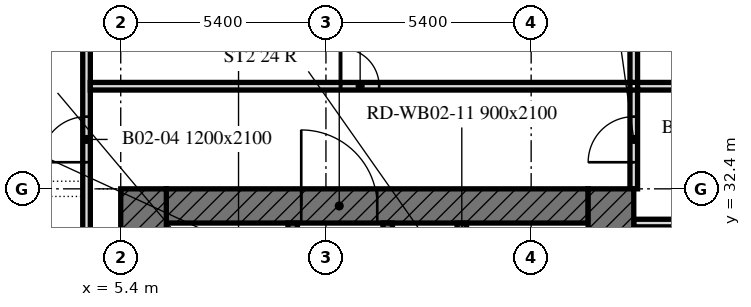
"""IFC4 building model, lengths in metres.
Left out: names, types, materials, properties, quantities, classifications, styles, units other than length and angle.
Written with IfcOpenShell. Run it as: python <this file> out.ifc"""

import sys

from ifc_helpers import new_model, si_unit, direction, frame, frame_2d, origin, place, context, subcontext, project, spatial, rectangle, extrude, element, fill, save


model = new_model("IFC4")
c1 = context("Model", 3, precision=1e-05, world=origin(), true_north=direction((0.0, 1.0)))
c2 = subcontext(c1, "Body", "Model", "MODEL_VIEW")
j1 = project(units=[si_unit("LENGTHUNIT", "METRE"), si_unit("PLANEANGLEUNIT", "RADIAN")], contexts=[c1])
p1 = place(None, origin())
s1 = spatial("IfcSite", under=j1, at=p1, CompositionType="ELEMENT")
p2 = place(p1, origin())
s2 = spatial("IfcBuilding", under=s1, at=p2, CompositionType="ELEMENT")
p3 = place(p2, frame((0.0, 0.0, -9.0)))
s3 = spatial("IfcBuildingStorey", under=s2, at=p3, CompositionType="ELEMENT", Elevation=-9.0)
p4 = place(p3, frame((4.5, 4.4, 0.0), z_axis=(0.0, 0.0, 1.0), x_axis=(0.0, 1.0, 0.0)))
e1 = element("IfcWall", 1, at=p4, inside=s3, PredefinedType="PARTITIONING", context=c2, shape_type="SweptSolid", body=[
    extrude(rectangle(XDim=39.8, YDim=0.2, at=frame_2d((19.9, 0.0))), origin(), (0.0, 0.0, 1.0), 4.1),
])
p5 = place(p4, frame((9.9, 0.0, 0.0)))
e2 = element("IfcOpeningElement", 2, at=p5, cuts=e1, PredefinedType="OPENING", context=c2, shape_type="SweptSolid", body=[
    extrude(rectangle(XDim=1.2, YDim=2.1, at=frame_2d((0.6, 1.05))), frame((0.0, 0.11, 0.0), z_axis=(0.0, -1.0, 0.0), x_axis=(1.0, 0.0, 0.0)), (0.0, 0.0, 1.0), 0.22),
])
p6 = place(p4, frame((28.7, 0.0, 0.0)))
e3 = element("IfcOpeningElement", 3, at=p6, cuts=e1, PredefinedType="OPENING", context=c2, shape_type="SweptSolid", body=[
    extrude(rectangle(XDim=1.2, YDim=2.1, at=frame_2d((0.6, 1.05))), frame((0.0, 0.11, 0.0), z_axis=(0.0, -1.0, 0.0), x_axis=(1.0, 0.0, 0.0)), (0.0, 0.0, 1.0), 0.22),
])
p7 = place(p3, frame((18.9, 35.2, 0.0), z_axis=(0.0, 0.0, 1.0), x_axis=(0.0, 1.0, 0.0)))
e4 = element("IfcWall", 4, at=p7, inside=s3, PredefinedType="PARTITIONING", context=c2, shape_type="SweptSolid", body=[
    extrude(rectangle(XDim=8.8, YDim=0.2, at=frame_2d((4.4, 0.0))), origin(), (0.0, 0.0, 1.0), 4.1),
])
p8 = place(p3, frame((4.6, 35.1, 0.0), z_axis=(0.0, 0.0, 1.0), x_axis=(1.0, 0.0, 0.0)))
e5 = element("IfcWall", 5, at=p8, inside=s3, PredefinedType="PARTITIONING", context=c2, shape_type="SweptSolid", body=[
    extrude(rectangle(XDim=14.2, YDim=0.2, at=frame_2d((7.1, 0.0))), origin(), (0.0, 0.0, 1.0), 4.1),
])
p9 = place(p8, frame((6.6, 0.0, 0.0)))
e6 = element("IfcOpeningElement", 6, at=p9, cuts=e5, PredefinedType="OPENING", context=c2, shape_type="SweptSolid", body=[
    extrude(rectangle(XDim=1.0, YDim=2.1, at=frame_2d((0.5, 1.05))), frame((0.0, 0.11, 0.0), z_axis=(0.0, -1.0, 0.0), x_axis=(1.0, 0.0, 0.0)), (0.0, 0.0, 1.0), 0.22),
])
p10 = place(p3, frame((19.0, 35.1, 0.0), z_axis=(0.0, 0.0, 1.0), x_axis=(1.0, 0.0, 0.0)))
e7 = element("IfcWall", 7, at=p10, inside=s3, PredefinedType="PARTITIONING", context=c2, shape_type="SweptSolid", body=[
    extrude(rectangle(XDim=5.2, YDim=0.2, at=frame_2d((2.6, 0.0))), origin(), (0.0, 0.0, 1.0), 4.1),
])
p11 = place(p10, frame((2.1, 0.0, 0.0)))
e8 = element("IfcOpeningElement", 8, at=p11, cuts=e7, PredefinedType="OPENING", context=c2, shape_type="SweptSolid", body=[
    extrude(rectangle(XDim=1.0, YDim=2.1, at=frame_2d((0.5, 1.05))), frame((0.0, 0.11, 0.0), z_axis=(0.0, -1.0, 0.0), x_axis=(1.0, 0.0, 0.0)), (0.0, 0.0, 1.0), 0.22),
])
p12 = place(p3, frame((18.9, 32.4, 0.0), z_axis=(0.0, 0.0, 1.0), x_axis=(0.0, 1.0, 0.0)))
e9 = element("IfcWall", 9, at=p12, inside=s3, PredefinedType="PARTITIONING", context=c2, shape_type="SweptSolid", body=[
    extrude(rectangle(XDim=2.6, YDim=0.2, at=frame_2d((1.3, 0.0))), origin(), (0.0, 0.0, 1.0), 4.1),
])
p13 = place(p12, frame((0.7, 0.0, 0.0)))
e10 = element("IfcOpeningElement", 10, at=p13, cuts=e9, PredefinedType="OPENING", context=c2, shape_type="SweptSolid", body=[
    extrude(rectangle(XDim=1.2, YDim=2.1, at=frame_2d((0.6, 1.05))), frame((0.0, 0.11, 0.0), z_axis=(0.0, -1.0, 0.0), x_axis=(1.0, 0.0, 0.0)), (0.0, 0.0, 1.0), 0.22),
])
p14 = place(p3, frame((18.9, 31.5, 0.0), z_axis=(0.0, 0.0, 1.0), x_axis=(1.0, 0.0, 0.0)))
e11 = element("IfcWall", 11, at=p14, inside=s3, PredefinedType="PARTITIONING", context=c2, shape_type="SweptSolid", body=[
    extrude(rectangle(XDim=10.8, YDim=0.2, at=frame_2d((5.4, 0.0))), origin(), (0.0, 0.0, 1.0), 4.1),
])
p15 = place(p3, frame((6.6, 31.95, 0.0), z_axis=(0.0, 0.0, 1.0), x_axis=(1.0, 0.0, 0.0)))
e12 = element("IfcWall", 12, at=p15, inside=s3, PredefinedType="SOLIDWALL", context=c2, shape_type="SweptSolid", body=[
    extrude(rectangle(XDim=11.1, YDim=0.9, at=frame_2d((5.55, 0.0))), origin(), (0.0, 0.0, 1.0), 4.1),
])
p16 = place(p15, frame((3.55, 0.0, 0.0)))
e13 = element("IfcOpeningElement", 13, at=p16, cuts=e12, PredefinedType="OPENING", context=c2, shape_type="SweptSolid", body=[
    extrude(rectangle(XDim=2.0, YDim=2.4, at=frame_2d((1.0, 1.2))), frame((0.0, 0.45, 0.0), z_axis=(0.0, -1.0, 0.0), x_axis=(1.0, 0.0, 0.0)), (0.0, 0.0, 1.0), 0.9),
])
for number, where, z_axis, x_axis in (
    (14, (6.0, 16.2, 0.0), (0.0, 0.0, 1.0), (0.0, 1.0, 0.0)),
    (15, (18.3, 32.4, 0.0), (0.0, 0.0, 1.0), (0.0, -1.0, 0.0)),
):
    element("IfcWall", number, at=place(p3, frame(where, z_axis=z_axis, x_axis=x_axis)), inside=s3, PredefinedType="SOLIDWALL", context=c2, shape_type="SweptSolid", body=[
        extrude(rectangle(XDim=16.2, YDim=1.2, at=frame_2d((8.1, 0.0))), origin(), (0.0, 0.0, 1.0), 4.1),
    ])
p17 = place(p3, frame((9.925, 17.1, 0.0), z_axis=(0.0, 0.0, 1.0), x_axis=(0.0, 1.0, 0.0)))
e16 = element("IfcWall", 16, at=p17, inside=s3, PredefinedType="SOLIDWALL", context=c2, shape_type="SweptSolid", body=[
    extrude(rectangle(XDim=14.4, YDim=0.25, at=frame_2d((7.2, 0.0))), origin(), (0.0, 0.0, 1.0), 4.1),
])
p18 = place(p17, frame((4.6, 0.0, 0.0)))
e17 = element("IfcOpeningElement", 17, at=p18, cuts=e16, PredefinedType="OPENING", context=c2, shape_type="SweptSolid", body=[
    extrude(rectangle(XDim=1.0, YDim=2.1, at=frame_2d((0.5, 1.05))), frame((0.0, 0.125, 0.0), z_axis=(0.0, -1.0, 0.0), x_axis=(1.0, 0.0, 0.0)), (0.0, 0.0, 1.0), 0.25),
])
p19 = place(p17, frame((7.062, 0.0, 0.0)))
e18 = element("IfcOpeningElement", 18, at=p19, cuts=e16, PredefinedType="OPENING", context=c2, shape_type="SweptSolid", body=[
    extrude(rectangle(XDim=1.2, YDim=2.1, at=frame_2d((0.6, 1.05))), frame((0.0, 0.125, 0.0), z_axis=(0.0, -1.0, 0.0), x_axis=(1.0, 0.0, 0.0)), (0.0, 0.0, 1.0), 0.25),
])
p20 = place(p17, frame((9.925, 0.0, 0.0)))
e19 = element("IfcOpeningElement", 19, at=p20, cuts=e16, PredefinedType="OPENING", context=c2, shape_type="SweptSolid", body=[
    extrude(rectangle(XDim=1.1, YDim=2.1, at=frame_2d((0.55, 1.05))), frame((0.0, 0.125, 0.0), z_axis=(0.0, -1.0, 0.0), x_axis=(1.0, 0.0, 0.0)), (0.0, 0.0, 1.0), 0.25),
])
p21 = place(p17, frame((12.587, 0.0, 0.0)))
e20 = element("IfcOpeningElement", 20, at=p21, cuts=e16, PredefinedType="OPENING", context=c2, shape_type="SweptSolid", body=[
    extrude(rectangle(XDim=1.1, YDim=2.1, at=frame_2d((0.55, 1.05))), frame((0.0, 0.125, 0.0), z_axis=(0.0, -1.0, 0.0), x_axis=(1.0, 0.0, 0.0)), (0.0, 0.0, 1.0), 0.25),
])
p22 = place(p3, frame((14.375, 17.1, 0.0), z_axis=(0.0, 0.0, 1.0), x_axis=(0.0, 1.0, 0.0)))
e21 = element("IfcWall", 21, at=p22, inside=s3, PredefinedType="SOLIDWALL", context=c2, shape_type="SweptSolid", body=[
    extrude(rectangle(XDim=14.4, YDim=0.25, at=frame_2d((7.2, 0.0))), origin(), (0.0, 0.0, 1.0), 4.1),
])
p23 = place(p22, frame((13.15, 0.0, 0.0)))
e22 = element("IfcOpeningElement", 22, at=p23, cuts=e21, PredefinedType="OPENING", context=c2, shape_type="SweptSolid", body=[
    extrude(rectangle(XDim=1.0, YDim=2.1, at=frame_2d((0.5, 1.05))), frame((0.0, 0.125, 0.0), z_axis=(0.0, -1.0, 0.0), x_axis=(1.0, 0.0, 0.0)), (0.0, 0.0, 1.0), 0.25),
])
p24 = place(p22, frame((0.725, 0.0, 0.0)))
e23 = element("IfcOpeningElement", 23, at=p24, cuts=e21, PredefinedType="OPENING", context=c2, shape_type="SweptSolid", body=[
    extrude(rectangle(XDim=0.9, YDim=2.1, at=frame_2d((0.45, 1.05))), frame((0.0, 0.125, 0.0), z_axis=(0.0, -1.0, 0.0), x_axis=(1.0, 0.0, 0.0)), (0.0, 0.0, 1.0), 0.25),
])
p25 = place(p22, frame((3.225, 0.0, 0.0)))
e24 = element("IfcOpeningElement", 24, at=p25, cuts=e21, PredefinedType="OPENING", context=c2, shape_type="SweptSolid", body=[
    extrude(rectangle(XDim=0.9, YDim=2.1, at=frame_2d((0.45, 1.05))), frame((0.0, 0.125, 0.0), z_axis=(0.0, -1.0, 0.0), x_axis=(1.0, 0.0, 0.0)), (0.0, 0.0, 1.0), 0.25),
])
p26 = place(p22, frame((6.175, 0.0, 0.0)))
e25 = element("IfcOpeningElement", 25, at=p26, cuts=e21, PredefinedType="OPENING", context=c2, shape_type="SweptSolid", body=[
    extrude(rectangle(XDim=0.9, YDim=2.1, at=frame_2d((0.45, 1.05))), frame((0.0, 0.125, 0.0), z_axis=(0.0, -1.0, 0.0), x_axis=(1.0, 0.0, 0.0)), (0.0, 0.0, 1.0), 0.25),
])
p27 = place(p3, frame((12.425, 29.4, 0.0), z_axis=(0.0, 0.0, 1.0), x_axis=(0.0, 1.0, 0.0)))
e26 = element("IfcWall", 26, at=p27, inside=s3, PredefinedType="SOLIDWALL", context=c2, shape_type="SweptSolid", body=[
    extrude(rectangle(XDim=2.1, YDim=0.25, at=frame_2d((1.05, 0.0))), origin(), (0.0, 0.0, 1.0), 4.1),
])
p28 = place(p27, frame((0.5, 0.0, 0.0)))
e27 = element("IfcOpeningElement", 27, at=p28, cuts=e26, PredefinedType="OPENING", context=c2, shape_type="SweptSolid", body=[
    extrude(rectangle(XDim=1.0, YDim=2.1, at=frame_2d((0.5, 1.05))), frame((0.0, 0.125, 0.0), z_axis=(0.0, -1.0, 0.0), x_axis=(1.0, 0.0, 0.0)), (0.0, 0.0, 1.0), 0.25),
])
p29 = place(p6, origin())
e28 = element("IfcDoor", 28, at=p29, inside=s3, OperationType="SINGLE_SWING_LEFT", PredefinedType="DOOR", context=c2, shape_type="SweptSolid", body=[
    extrude(rectangle(XDim=1.2, YDim=2.1, at=frame_2d((0.6, 1.05))), frame((0.0, 0.025, 0.0), z_axis=(0.0, -1.0, 0.0), x_axis=(1.0, 0.0, 0.0)), (0.0, 0.0, 1.0), 0.05),
])
fill(e3, e28)
p30 = place(p9, origin())
e29 = element("IfcDoor", 29, at=p30, inside=s3, OperationType="SINGLE_SWING_LEFT", PredefinedType="DOOR", context=c2, shape_type="SweptSolid", body=[
    extrude(rectangle(XDim=1.0, YDim=2.1, at=frame_2d((0.5, 1.05))), frame((0.0, 0.025, 0.0), z_axis=(0.0, -1.0, 0.0), x_axis=(1.0, 0.0, 0.0)), (0.0, 0.0, 1.0), 0.05),
])
fill(e6, e29)
p31 = place(p13, origin())
e30 = element("IfcDoor", 30, at=p31, inside=s3, OperationType="SINGLE_SWING_LEFT", PredefinedType="DOOR", context=c2, shape_type="SweptSolid", body=[
    extrude(rectangle(XDim=1.2, YDim=2.1, at=frame_2d((0.6, 1.05))), frame((0.0, 0.025, 0.0), z_axis=(0.0, -1.0, 0.0), x_axis=(1.0, 0.0, 0.0)), (0.0, 0.0, 1.0), 0.05),
])
fill(e10, e30)
p32 = place(p16, origin())
e31 = element("IfcDoor", 31, at=p32, inside=s3, OperationType="DOUBLE_DOOR_SINGLE_SWING", PredefinedType="DOOR", context=c2, shape_type="SweptSolid", body=[
    extrude(rectangle(XDim=2.0, YDim=2.4, at=frame_2d((1.0, 1.2))), frame((0.0, 0.025, 0.0), z_axis=(0.0, -1.0, 0.0), x_axis=(1.0, 0.0, 0.0)), (0.0, 0.0, 1.0), 0.05),
])
fill(e13, e31)
save(model, sys.argv[1])
